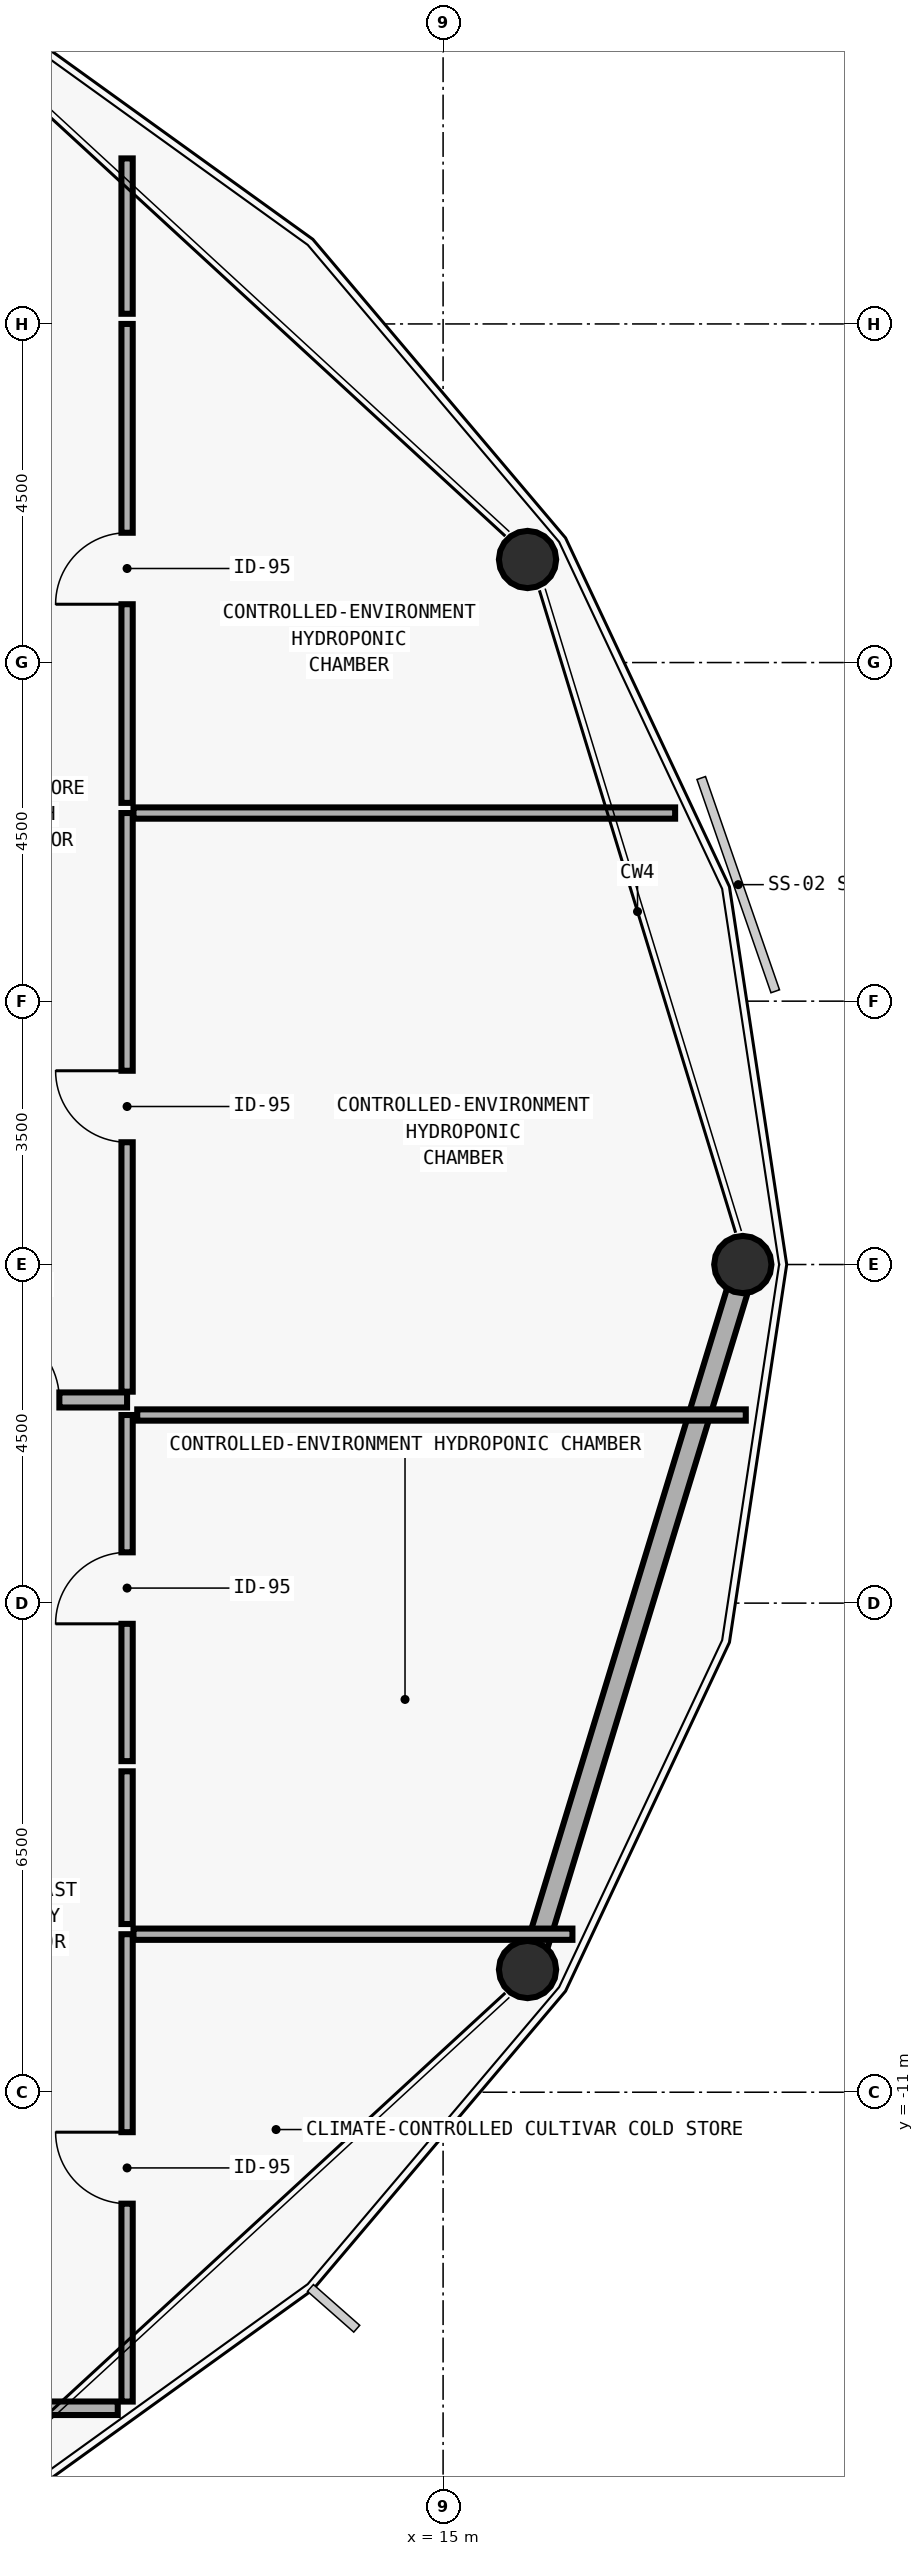
"""IFC4 building model, lengths in metres.
Left out: names, types, materials, properties, quantities, classifications, styles, units other than length and angle.
Written with IfcOpenShell. Run it as: python <this file> out.ifc"""

import sys

from ifc_helpers import new_model, si_unit, direction, frame, frame_2d, origin, origin_2d, place, context, subcontext, project, spatial, rectangle, hollow_circle, extrude, element, fill, save


model = new_model("IFC4")
c1 = context("Model", 3, precision=1e-05, world=origin(), true_north=direction((0.0, 1.0)))
c2 = subcontext(c1, "Body", "Model", "MODEL_VIEW")
j1 = project(units=[si_unit("LENGTHUNIT", "METRE"), si_unit("PLANEANGLEUNIT", "RADIAN")], contexts=[c1])
p1 = place(None, origin())
s1 = spatial("IfcSite", under=j1, at=p1, CompositionType="ELEMENT")
p2 = place(p1, origin())
s2 = spatial("IfcBuilding", under=s1, at=p2, CompositionType="ELEMENT")
p3 = place(p2, frame((0.0, 0.0, 165.6)))
s3 = spatial("IfcBuildingStorey", under=s2, at=p3, CompositionType="ELEMENT", Elevation=165.6)
p4 = place(p3, frame((19.017, 0.0, 0.0), z_axis=(-0.019457075977, 0.0, 0.999810693179), x_axis=(0.0, -1.0, 0.0)))
e1 = element("IfcColumn", 1, at=p4, inside=s3, PredefinedType="COLUMN", context=c2, shape_type="SweptSolid", body=[
    extrude(hollow_circle(Radius=0.381, WallThickness=0.028, at=origin_2d()), origin(), (0.0, 0.0, 1.0), 3.451),
])
for number, where, z_axis, x_axis in (
    (2, (16.151, 9.382, 0.0), (-0.017, -0.007, 1.0), (0.384, -0.923, 0.0)),
    (3, (16.151, -9.382, 0.0), (-0.017, 0.007, 1.0), (-0.384, -0.923, 0.0)),
):
    element("IfcColumn", number, at=place(p3, frame(where, z_axis=z_axis, x_axis=x_axis)), inside=s3, PredefinedType="COLUMN", context=c2, shape_type="SweptSolid", body=[
        extrude(hollow_circle(Radius=0.381, WallThickness=0.028, at=origin_2d()), origin(), (0.0, 0.0, 1.0), 3.45),
    ])
p5 = place(p3, frame((18.919, -0.321, 0.0), z_axis=(0.0, 0.0, 1.0), x_axis=(-0.292111961986, -0.956384128719, 0.0)))
e4 = element("IfcWall", 4, at=p5, inside=s3, PredefinedType="SOLIDWALL", context=c2, shape_type="SweptSolid", body=[
    extrude(rectangle(XDim=9.137, YDim=0.28, at=frame_2d((4.569, 0.0))), origin(), (0.0, 0.0, 1.0), 2.97),
])
p6 = place(p3, frame((8.16, -1.8, 0.0), z_axis=(0.0, 0.0, 1.0), x_axis=(1.0, 0.0, 0.0)))
e5 = element("IfcWall", 5, at=p6, inside=s3, PredefinedType="MOVABLE", context=c2, shape_type="SweptSolid", body=[
    extrude(rectangle(XDim=2.64, YDim=0.2, at=frame_2d((1.32, 0.0))), origin(), (0.0, 0.0, 1.0), 3.45),
])
p7 = place(p6, frame((0.74, 0.0, 0.0)))
e6 = element("IfcOpeningElement", 6, at=p7, cuts=e5, PredefinedType="OPENING", context=c2, shape_type="SweptSolid", body=[
    extrude(rectangle(XDim=1.0, YDim=2.1, at=frame_2d((0.5, 1.05))), frame((0.0, 0.11, 0.0), z_axis=(0.0, -1.0, 0.0), x_axis=(1.0, 0.0, 0.0)), (0.0, 0.0, 1.0), 0.22),
])
p8 = place(p3, frame((10.8, -15.111, 0.0), z_axis=(0.0, 0.0, 1.0), x_axis=(0.0, 1.0, 0.0)))
e7 = element("IfcWall", 7, at=p8, inside=s3, PredefinedType="PARTITIONING", context=c2, shape_type="SweptSolid", body=[
    extrude(rectangle(XDim=6.211, YDim=0.15, at=frame_2d((3.105, 0.0))), origin(), (0.0, 0.0, 1.0), 3.45),
])
p9 = place(p8, frame((2.63, 0.0, 0.0)))
e8 = element("IfcOpeningElement", 8, at=p9, cuts=e7, PredefinedType="OPENING", context=c2, shape_type="SweptSolid", body=[
    extrude(rectangle(XDim=0.95, YDim=2.1, at=frame_2d((0.475, 1.05))), frame((0.0, 0.085, 0.0), z_axis=(0.0, -1.0, 0.0), x_axis=(1.0, 0.0, 0.0)), (0.0, 0.0, 1.0), 0.17),
])
p10 = place(p3, frame((10.8, -6.6, 0.0), z_axis=(0.0, 0.0, 1.0), x_axis=(0.0, 1.0, 0.0)))
e9 = element("IfcWall", 9, at=p10, inside=s3, PredefinedType="PARTITIONING", context=c2, shape_type="SweptSolid", body=[
    extrude(rectangle(XDim=4.6, YDim=0.15, at=frame_2d((2.3, 0.0))), origin(), (0.0, 0.0, 1.0), 3.45),
])
p11 = place(p10, frame((1.825, 0.0, 0.0)))
e10 = element("IfcOpeningElement", 10, at=p11, cuts=e9, PredefinedType="OPENING", context=c2, shape_type="SweptSolid", body=[
    extrude(rectangle(XDim=0.95, YDim=2.1, at=frame_2d((0.475, 1.05))), frame((0.0, 0.085, 0.0), z_axis=(0.0, -1.0, 0.0), x_axis=(1.0, 0.0, 0.0)), (0.0, 0.0, 1.0), 0.17),
])
p12 = place(p3, frame((10.8, -1.69, 0.0), z_axis=(0.0, 0.0, 1.0), x_axis=(0.0, 1.0, 0.0)))
e11 = element("IfcWall", 11, at=p12, inside=s3, PredefinedType="PARTITIONING", context=c2, shape_type="SweptSolid", body=[
    extrude(rectangle(XDim=7.69, YDim=0.15, at=frame_2d((3.845, 0.0))), origin(), (0.0, 0.0, 1.0), 3.45),
])
p13 = place(p12, frame((3.315, 0.0, 0.0)))
e12 = element("IfcOpeningElement", 12, at=p13, cuts=e11, PredefinedType="OPENING", context=c2, shape_type="SweptSolid", body=[
    extrude(rectangle(XDim=0.95, YDim=2.1, at=frame_2d((0.475, 1.05))), frame((0.0, 0.085, 0.0), z_axis=(0.0, -1.0, 0.0), x_axis=(1.0, 0.0, 0.0)), (0.0, 0.0, 1.0), 0.17),
])
p14 = place(p3, frame((10.8, 6.135, 0.0), z_axis=(0.0, 0.0, 1.0), x_axis=(0.0, 1.0, 0.0)))
e13 = element("IfcWall", 13, at=p14, inside=s3, PredefinedType="PARTITIONING", context=c2, shape_type="SweptSolid", body=[
    extrude(rectangle(XDim=6.365, YDim=0.15, at=frame_2d((3.183, 0.0))), origin(), (0.0, 0.0, 1.0), 3.45),
])
p15 = place(p14, frame((2.64, 0.0, 0.0)))
e14 = element("IfcOpeningElement", 14, at=p15, cuts=e13, PredefinedType="OPENING", context=c2, shape_type="SweptSolid", body=[
    extrude(rectangle(XDim=0.95, YDim=2.1, at=frame_2d((0.475, 1.05))), frame((0.0, 0.085, 0.0), z_axis=(0.0, -1.0, 0.0), x_axis=(1.0, 0.0, 0.0)), (0.0, 0.0, 1.0), 0.17),
])
p16 = place(p3, frame((8.1, -15.2, 0.0), z_axis=(0.0, 0.0, 1.0), x_axis=(1.0, 0.0, 0.0)))
e15 = element("IfcWall", 15, at=p16, inside=s3, PredefinedType="PLUMBINGWALL", context=c2, shape_type="SweptSolid", body=[
    extrude(rectangle(XDim=2.576, YDim=0.18, at=frame_2d((1.288, 0.0))), origin(), (0.0, 0.0, 1.0), 3.45),
])
p17 = place(p3, frame((10.885, -8.9, 0.0), z_axis=(0.0, 0.0, 1.0), x_axis=(1.0, 0.0, 0.0)))
e16 = element("IfcWall", 16, at=p17, inside=s3, PredefinedType="PARTITIONING", context=c2, shape_type="SweptSolid", body=[
    extrude(rectangle(XDim=5.834, YDim=0.15, at=frame_2d((2.917, 0.0))), origin(), (0.0, 0.0, 1.0), 2.882),
])
p18 = place(p3, frame((10.8, -8.765, 0.0), z_axis=(0.0, 0.0, 1.0), x_axis=(0.0, 1.0, 0.0)))
e17 = element("IfcWall", 17, at=p18, inside=s3, PredefinedType="PARTITIONING", context=c2, shape_type="SweptSolid", body=[
    extrude(rectangle(XDim=2.03, YDim=0.15, at=frame_2d((1.015, 0.0))), origin(), (0.0, 0.0, 1.0), 3.45),
])
p19 = place(p3, frame((10.935, -2.0, 0.0), z_axis=(0.0, 0.0, 1.0), x_axis=(1.0, 0.0, 0.0)))
e18 = element("IfcWall", 18, at=p19, inside=s3, PredefinedType="PARTITIONING", context=c2, shape_type="SweptSolid", body=[
    extrude(rectangle(XDim=8.088, YDim=0.15, at=frame_2d((4.044, 0.0))), origin(), (0.0, 0.0, 1.0), 3.45),
])
p20 = place(p3, frame((10.885, 6.0, 0.0), z_axis=(0.0, 0.0, 1.0), x_axis=(1.0, 0.0, 0.0)))
e19 = element("IfcWall", 19, at=p20, inside=s3, PredefinedType="PARTITIONING", context=c2, shape_type="SweptSolid", body=[
    extrude(rectangle(XDim=7.199, YDim=0.15, at=frame_2d((3.6, 0.0))), origin(), (0.0, 0.0, 1.0), 3.45),
])
p21 = place(p3, frame((10.8, 12.635, 0.0), z_axis=(0.0, 0.0, 1.0), x_axis=(0.0, 1.0, 0.0)))
e20 = element("IfcWall", 20, at=p21, inside=s3, PredefinedType="PARTITIONING", context=c2, shape_type="SweptSolid", body=[
    extrude(rectangle(XDim=2.065, YDim=0.15, at=frame_2d((1.032, 0.0))), origin(), (0.0, 0.0, 1.0), 3.45),
])
p22 = place(p7, origin())
e21 = element("IfcDoor", 21, at=p22, inside=s3, OperationType="SINGLE_SWING_LEFT", PredefinedType="DOOR", context=c2, shape_type="SweptSolid", body=[
    extrude(rectangle(XDim=1.0, YDim=2.1, at=frame_2d((0.5, 1.05))), frame((0.0, 0.025, 0.0), z_axis=(0.0, -1.0, 0.0), x_axis=(1.0, 0.0, 0.0)), (0.0, 0.0, 1.0), 0.05),
])
fill(e6, e21)
p23 = place(p9, origin())
e22 = element("IfcDoor", 22, at=p23, inside=s3, OperationType="SINGLE_SWING_RIGHT", PredefinedType="DOOR", context=c2, shape_type="SweptSolid", body=[
    extrude(rectangle(XDim=0.95, YDim=2.1, at=frame_2d((0.475, 1.05))), frame((0.0, 0.025, 0.0), z_axis=(0.0, -1.0, 0.0), x_axis=(1.0, 0.0, 0.0)), (0.0, 0.0, 1.0), 0.05),
])
fill(e8, e22)
p24 = place(p11, origin())
e23 = element("IfcDoor", 23, at=p24, inside=s3, OperationType="SINGLE_SWING_LEFT", PredefinedType="DOOR", context=c2, shape_type="SweptSolid", body=[
    extrude(rectangle(XDim=0.95, YDim=2.1, at=frame_2d((0.475, 1.05))), frame((0.0, 0.025, 0.0), z_axis=(0.0, -1.0, 0.0), x_axis=(1.0, 0.0, 0.0)), (0.0, 0.0, 1.0), 0.05),
])
fill(e10, e23)
p25 = place(p13, origin())
e24 = element("IfcDoor", 24, at=p25, inside=s3, OperationType="SINGLE_SWING_RIGHT", PredefinedType="DOOR", context=c2, shape_type="SweptSolid", body=[
    extrude(rectangle(XDim=0.95, YDim=2.1, at=frame_2d((0.475, 1.05))), frame((0.0, 0.025, 0.0), z_axis=(0.0, -1.0, 0.0), x_axis=(1.0, 0.0, 0.0)), (0.0, 0.0, 1.0), 0.05),
])
fill(e12, e24)
p26 = place(p15, origin())
e25 = element("IfcDoor", 25, at=p26, inside=s3, OperationType="SINGLE_SWING_LEFT", PredefinedType="DOOR", context=c2, shape_type="SweptSolid", body=[
    extrude(rectangle(XDim=0.95, YDim=2.1, at=frame_2d((0.475, 1.05))), frame((0.0, 0.025, 0.0), z_axis=(0.0, -1.0, 0.0), x_axis=(1.0, 0.0, 0.0)), (0.0, 0.0, 1.0), 0.05),
])
fill(e14, e25)
save(model, sys.argv[1])
